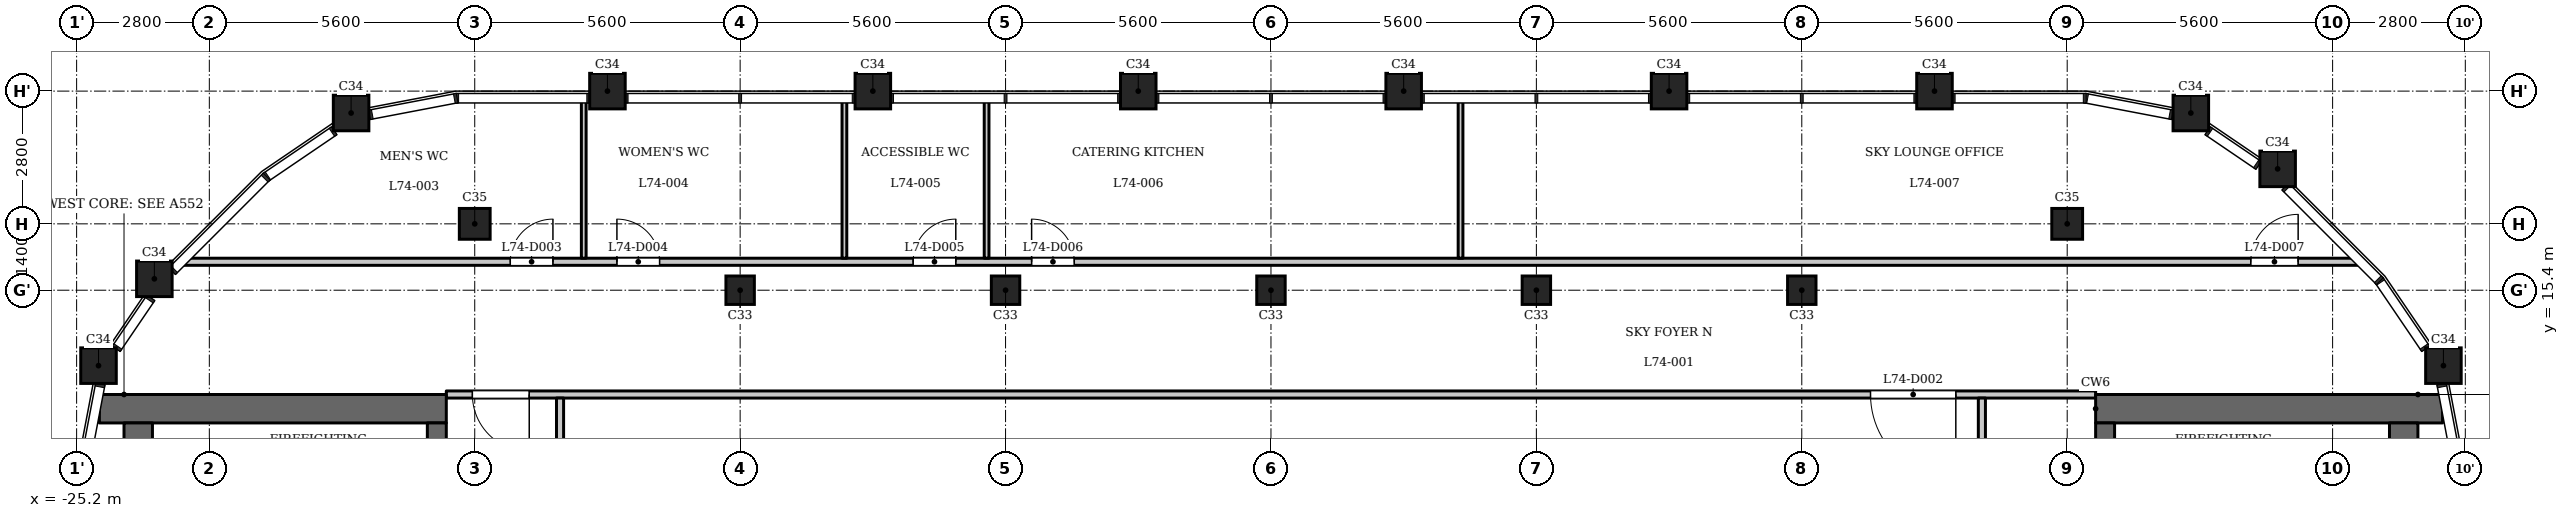
"""IFC4 building model, lengths in metres.
Left out: names, types, materials, properties, quantities, classifications, styles, units other than length and angle.
Written with IfcOpenShell. Run it as: python <this file> out.ifc"""

import sys

from ifc_helpers import new_model, si_unit, direction, frame, frame_2d, origin, origin_2d, place, context, subcontext, project, spatial, rectangle, extrude, element, fill, save


model = new_model("IFC4")
c1 = context("Model", 3, precision=1e-05, world=origin(), true_north=direction((0.0, 1.0)))
c2 = subcontext(c1, "Body", "Model", "MODEL_VIEW")
j1 = project(units=[si_unit("LENGTHUNIT", "METRE"), si_unit("PLANEANGLEUNIT", "RADIAN")], contexts=[c1])
p1 = place(None, origin())
s1 = spatial("IfcSite", under=j1, at=p1, CompositionType="ELEMENT")
p2 = place(p1, origin())
s2 = spatial("IfcBuilding", under=s1, at=p2, CompositionType="ELEMENT")
p3 = place(p2, frame((0.0, 0.0, 283.7)))
s3 = spatial("IfcBuildingStorey", under=s2, at=p3, CompositionType="ELEMENT", Elevation=283.7)
for number, where, z_axis, x_axis in (
    (1, (24.738, 13.809, 0.0), (0.0, 0.0, 1.0), (1.0, 0.0, 0.0)),
    (2, (21.24, 17.96, 0.0), (0.0, 0.0, 1.0), (1.0, 0.0, 0.0)),
    (3, (19.409, 19.138, 0.0), (0.0, 0.0, 1.0), (1.0, 0.0, 0.0)),
    (4, (14.0, 19.6, 0.0), (0.0, 0.0, 1.0), (1.0, 0.0, 0.0)),
    (5, (8.4, 19.6, 0.0), (0.0, 0.0, 1.0), (1.0, 0.0, 0.0)),
    (6, (2.8, 19.6, 0.0), (0.0, 0.0, 1.0), (1.0, 0.0, 0.0)),
    (7, (-2.8, 19.6, 0.0), (0.0, 0.0, 1.0), (1.0, 0.0, 0.0)),
    (8, (-8.4, 19.6, 0.0), (0.0, 0.0, 1.0), (1.0, 0.0, 0.0)),
    (9, (-14.0, 19.6, 0.0), (0.0, 0.0, 1.0), (1.0, 0.0, 0.0)),
    (10, (-19.409, 19.138, 0.0), (0.0, 0.0, 1.0), (1.0, 0.0, 0.0)),
    (11, (-23.56, 15.64, 0.0), (0.0, 0.0, 1.0), (1.0, 0.0, 0.0)),
    (12, (-24.738, 13.809, 0.0), (0.0, 0.0, 1.0), (1.0, 0.0, 0.0)),
):
    element("IfcColumn", number, at=place(p3, frame(where, z_axis=z_axis, x_axis=x_axis)), inside=s3, PredefinedType="COLUMN", context=c2, shape_type="SweptSolid", body=[
        extrude(rectangle(XDim=0.75, YDim=0.75, at=origin_2d()), origin(), (0.0, 0.0, 1.0), 5.4),
    ])
for number, where, z_axis, x_axis in (
    (13, (-16.8, 16.8, 0.0), (0.0, 0.0, 1.0), (1.0, 0.0, 0.0)),
    (14, (16.8, 16.8, 0.0), (0.0, 0.0, 1.0), (1.0, 0.0, 0.0)),
):
    element("IfcColumn", number, at=place(p3, frame(where, z_axis=z_axis, x_axis=x_axis)), inside=s3, PredefinedType="COLUMN", context=c2, shape_type="SweptSolid", body=[
        extrude(rectangle(XDim=0.65, YDim=0.65, at=origin_2d()), origin(), (0.0, 0.0, 1.0), 5.4),
    ])
for number, where, z_axis, x_axis in (
    (15, (-11.2, 15.4, 0.0), (0.0, 0.0, 1.0), (1.0, 0.0, 0.0)),
    (16, (-5.6, 15.4, 0.0), (0.0, 0.0, 1.0), (1.0, 0.0, 0.0)),
    (17, (0.0, 15.4, 0.0), (0.0, 0.0, 1.0), (1.0, 0.0, 0.0)),
    (18, (5.6, 15.4, 0.0), (0.0, 0.0, 1.0), (1.0, 0.0, 0.0)),
    (19, (11.2, 15.4, 0.0), (0.0, 0.0, 1.0), (1.0, 0.0, 0.0)),
):
    element("IfcColumn", number, at=place(p3, frame(where, z_axis=z_axis, x_axis=x_axis)), inside=s3, PredefinedType="COLUMN", context=c2, shape_type="SweptSolid", body=[
        extrude(rectangle(XDim=0.6, YDim=0.6, at=origin_2d()), origin(), (0.0, 0.0, 1.0), 5.4),
    ])
p4 = place(p3, frame((-17.4, 12.9, 0.0), z_axis=(0.0, 0.0, 1.0), x_axis=(-1.0, 0.0, 0.0)))
e20 = element("IfcWall", 20, at=p4, inside=s3, PredefinedType="SHEAR", context=c2, shape_type="SweptSolid", body=[
    extrude(rectangle(XDim=7.32, YDim=0.6, at=frame_2d((3.66, 0.0))), origin(), (0.0, 0.0, 1.0), 4.95),
])
p5 = place(p3, frame((-17.6, -12.6, 0.0), z_axis=(0.0, 0.0, 1.0), x_axis=(0.0, 1.0, 0.0)))
e21 = element("IfcWall", 21, at=p5, inside=s3, PredefinedType="SHEAR", context=c2, shape_type="SweptSolid", body=[
    extrude(rectangle(XDim=25.2, YDim=0.4, at=frame_2d((12.6, 0.0))), origin(), (0.0, 0.0, 1.0), 4.95),
])
p6 = place(p5, frame((6.3, 0.0, 0.0)))
e22 = element("IfcOpeningElement", 22, at=p6, cuts=e21, PredefinedType="OPENING", context=c2, shape_type="SweptSolid", body=[
    extrude(rectangle(XDim=1.1, YDim=2.1, at=frame_2d((0.55, 1.05))), frame((0.0, 0.21, 0.0), z_axis=(0.0, -1.0, 0.0), x_axis=(1.0, 0.0, 0.0)), (0.0, 0.0, 1.0), 0.42),
])
p7 = place(p5, frame((8.7, 0.0, 0.0)))
e23 = element("IfcOpeningElement", 23, at=p7, cuts=e21, PredefinedType="OPENING", context=c2, shape_type="SweptSolid", body=[
    extrude(rectangle(XDim=1.1, YDim=2.1, at=frame_2d((0.55, 1.05))), frame((0.0, 0.21, 0.0), z_axis=(0.0, -1.0, 0.0), x_axis=(1.0, 0.0, 0.0)), (0.0, 0.0, 1.0), 0.42),
])
p8 = place(p5, frame((11.2, 0.0, 0.0)))
e24 = element("IfcOpeningElement", 24, at=p8, cuts=e21, PredefinedType="OPENING", context=c2, shape_type="SweptSolid", body=[
    extrude(rectangle(XDim=0.9, YDim=2.1, at=frame_2d((0.45, 1.05))), frame((0.0, 0.21, 0.0), z_axis=(0.0, -1.0, 0.0), x_axis=(1.0, 0.0, 0.0)), (0.0, 0.0, 1.0), 0.42),
])
p9 = place(p5, frame((17.05, 0.0, 0.0)))
e25 = element("IfcOpeningElement", 25, at=p9, cuts=e21, PredefinedType="OPENING", context=c2, shape_type="SweptSolid", body=[
    extrude(rectangle(XDim=0.9, YDim=2.1, at=frame_2d((0.45, 1.05))), frame((0.0, 0.21, 0.0), z_axis=(0.0, -1.0, 0.0), x_axis=(1.0, 0.0, 0.0)), (0.0, 0.0, 1.0), 0.42),
])
p10 = place(p5, frame((23.25, 0.0, 0.0)))
e26 = element("IfcOpeningElement", 26, at=p10, cuts=e21, PredefinedType="OPENING", context=c2, shape_type="SweptSolid", body=[
    extrude(rectangle(XDim=1.1, YDim=2.1, at=frame_2d((0.55, 1.05))), frame((0.0, 0.21, 0.0), z_axis=(0.0, -1.0, 0.0), x_axis=(1.0, 0.0, 0.0)), (0.0, 0.0, 1.0), 0.42),
])
p11 = place(p5, frame((0.85, 0.0, 0.0)))
e27 = element("IfcOpeningElement", 27, at=p11, cuts=e21, PredefinedType="OPENING", context=c2, shape_type="SweptSolid", body=[
    extrude(rectangle(XDim=1.1, YDim=2.1, at=frame_2d((0.55, 1.05))), frame((0.0, 0.21, 0.0), z_axis=(0.0, -1.0, 0.0), x_axis=(1.0, 0.0, 0.0)), (0.0, 0.0, 1.0), 0.42),
])
p12 = place(p5, frame((13.075, 0.0, 0.0)))
e28 = element("IfcOpeningElement", 28, at=p12, cuts=e21, PredefinedType="OPENING", context=c2, shape_type="SweptSolid", body=[
    extrude(rectangle(XDim=1.8, YDim=2.1, at=frame_2d((0.9, 1.05))), frame((0.0, 0.21, 0.0), z_axis=(0.0, -1.0, 0.0), x_axis=(1.0, 0.0, 0.0)), (0.0, 0.0, 1.0), 0.42),
])
p13 = place(p3, frame((-23.9, -12.6, 0.0), z_axis=(0.0, 0.0, 1.0), x_axis=(0.0, 1.0, 0.0)))
e29 = element("IfcWall", 29, at=p13, inside=s3, PredefinedType="SHEAR", context=c2, shape_type="SweptSolid", body=[
    extrude(rectangle(XDim=25.2, YDim=0.6, at=frame_2d((12.6, 0.0))), origin(), (0.0, 0.0, 1.0), 4.95),
])
p14 = place(p3, frame((17.4, 12.9, 0.0), z_axis=(0.0, 0.0, 1.0), x_axis=(1.0, 0.0, 0.0)))
e30 = element("IfcWall", 30, at=p14, inside=s3, PredefinedType="SHEAR", context=c2, shape_type="SweptSolid", body=[
    extrude(rectangle(XDim=7.32, YDim=0.6, at=frame_2d((3.66, 0.0))), origin(), (0.0, 0.0, 1.0), 4.95),
])
p15 = place(p3, frame((17.6, -12.6, 0.0), z_axis=(0.0, 0.0, 1.0), x_axis=(0.0, 1.0, 0.0)))
e31 = element("IfcWall", 31, at=p15, inside=s3, PredefinedType="SHEAR", context=c2, shape_type="SweptSolid", body=[
    extrude(rectangle(XDim=25.2, YDim=0.4, at=frame_2d((12.6, 0.0))), origin(), (0.0, 0.0, 1.0), 4.95),
])
p16 = place(p15, frame((6.3, 0.0, 0.0)))
e32 = element("IfcOpeningElement", 32, at=p16, cuts=e31, PredefinedType="OPENING", context=c2, shape_type="SweptSolid", body=[
    extrude(rectangle(XDim=1.1, YDim=2.1, at=frame_2d((0.55, 1.05))), frame((0.0, 0.21, 0.0), z_axis=(0.0, -1.0, 0.0), x_axis=(1.0, 0.0, 0.0)), (0.0, 0.0, 1.0), 0.42),
])
p17 = place(p15, frame((8.7, 0.0, 0.0)))
e33 = element("IfcOpeningElement", 33, at=p17, cuts=e31, PredefinedType="OPENING", context=c2, shape_type="SweptSolid", body=[
    extrude(rectangle(XDim=1.1, YDim=2.1, at=frame_2d((0.55, 1.05))), frame((0.0, 0.21, 0.0), z_axis=(0.0, -1.0, 0.0), x_axis=(1.0, 0.0, 0.0)), (0.0, 0.0, 1.0), 0.42),
])
p18 = place(p15, frame((11.2, 0.0, 0.0)))
e34 = element("IfcOpeningElement", 34, at=p18, cuts=e31, PredefinedType="OPENING", context=c2, shape_type="SweptSolid", body=[
    extrude(rectangle(XDim=0.9, YDim=2.1, at=frame_2d((0.45, 1.05))), frame((0.0, 0.21, 0.0), z_axis=(0.0, -1.0, 0.0), x_axis=(1.0, 0.0, 0.0)), (0.0, 0.0, 1.0), 0.42),
])
p19 = place(p15, frame((17.05, 0.0, 0.0)))
e35 = element("IfcOpeningElement", 35, at=p19, cuts=e31, PredefinedType="OPENING", context=c2, shape_type="SweptSolid", body=[
    extrude(rectangle(XDim=0.9, YDim=2.1, at=frame_2d((0.45, 1.05))), frame((0.0, 0.21, 0.0), z_axis=(0.0, -1.0, 0.0), x_axis=(1.0, 0.0, 0.0)), (0.0, 0.0, 1.0), 0.42),
])
p20 = place(p15, frame((23.25, 0.0, 0.0)))
e36 = element("IfcOpeningElement", 36, at=p20, cuts=e31, PredefinedType="OPENING", context=c2, shape_type="SweptSolid", body=[
    extrude(rectangle(XDim=1.1, YDim=2.1, at=frame_2d((0.55, 1.05))), frame((0.0, 0.21, 0.0), z_axis=(0.0, -1.0, 0.0), x_axis=(1.0, 0.0, 0.0)), (0.0, 0.0, 1.0), 0.42),
])
p21 = place(p15, frame((0.85, 0.0, 0.0)))
e37 = element("IfcOpeningElement", 37, at=p21, cuts=e31, PredefinedType="OPENING", context=c2, shape_type="SweptSolid", body=[
    extrude(rectangle(XDim=1.1, YDim=2.1, at=frame_2d((0.55, 1.05))), frame((0.0, 0.21, 0.0), z_axis=(0.0, -1.0, 0.0), x_axis=(1.0, 0.0, 0.0)), (0.0, 0.0, 1.0), 0.42),
])
p22 = place(p15, frame((13.075, 0.0, 0.0)))
e38 = element("IfcOpeningElement", 38, at=p22, cuts=e31, PredefinedType="OPENING", context=c2, shape_type="SweptSolid", body=[
    extrude(rectangle(XDim=1.8, YDim=2.1, at=frame_2d((0.9, 1.05))), frame((0.0, 0.21, 0.0), z_axis=(0.0, -1.0, 0.0), x_axis=(1.0, 0.0, 0.0)), (0.0, 0.0, 1.0), 0.42),
])
p23 = place(p3, frame((23.9, -12.6, 0.0), z_axis=(0.0, 0.0, 1.0), x_axis=(0.0, 1.0, 0.0)))
e39 = element("IfcWall", 39, at=p23, inside=s3, PredefinedType="SHEAR", context=c2, shape_type="SweptSolid", body=[
    extrude(rectangle(XDim=25.2, YDim=0.6, at=frame_2d((12.6, 0.0))), origin(), (0.0, 0.0, 1.0), 4.95),
])
p24 = place(p3, frame((-17.4, 13.2, 0.0), z_axis=(0.0, 0.0, 1.0), x_axis=(1.0, 0.0, 0.0)))
e40 = element("IfcWall", 40, at=p24, inside=s3, PredefinedType="PARTITIONING", context=c2, shape_type="SweptSolid", body=[
    extrude(rectangle(XDim=34.8, YDim=0.15, at=frame_2d((17.4, 0.0))), origin(), (0.0, 0.0, 1.0), 4.95),
])
p25 = place(p24, frame((0.55, 0.0, 0.0)))
e41 = element("IfcOpeningElement", 41, at=p25, cuts=e40, PredefinedType="OPENING", context=c2, shape_type="SweptSolid", body=[
    extrude(rectangle(XDim=1.2, YDim=2.1, at=frame_2d((0.6, 1.05))), frame((0.0, 0.085, 0.0), z_axis=(0.0, -1.0, 0.0), x_axis=(1.0, 0.0, 0.0)), (0.0, 0.0, 1.0), 0.17),
])
p26 = place(p24, frame((30.05, 0.0, 0.0)))
e42 = element("IfcOpeningElement", 42, at=p26, cuts=e40, PredefinedType="OPENING", context=c2, shape_type="SweptSolid", body=[
    extrude(rectangle(XDim=1.8, YDim=2.1, at=frame_2d((0.9, 1.05))), frame((0.0, 0.085, 0.0), z_axis=(0.0, -1.0, 0.0), x_axis=(1.0, 0.0, 0.0)), (0.0, 0.0, 1.0), 0.17),
])
p27 = place(p3, frame((-22.948, 16.0, 0.0), z_axis=(0.0, 0.0, 1.0), x_axis=(1.0, 0.0, 0.0)))
e43 = element("IfcWall", 43, at=p27, inside=s3, PredefinedType="PARTITIONING", context=c2, shape_type="SweptSolid", body=[
    extrude(rectangle(XDim=45.896, YDim=0.15, at=frame_2d((22.948, 0.0))), origin(), (0.0, 0.0, 1.0), 4.95),
])
p28 = place(p27, frame((6.898, 0.0, 0.0)))
e44 = element("IfcOpeningElement", 44, at=p28, cuts=e43, PredefinedType="OPENING", context=c2, shape_type="SweptSolid", body=[
    extrude(rectangle(XDim=0.9, YDim=2.1, at=frame_2d((0.45, 1.05))), frame((0.0, 0.085, 0.0), z_axis=(0.0, -1.0, 0.0), x_axis=(1.0, 0.0, 0.0)), (0.0, 0.0, 1.0), 0.17),
])
p29 = place(p27, frame((9.148, 0.0, 0.0)))
e45 = element("IfcOpeningElement", 45, at=p29, cuts=e43, PredefinedType="OPENING", context=c2, shape_type="SweptSolid", body=[
    extrude(rectangle(XDim=0.9, YDim=2.1, at=frame_2d((0.45, 1.05))), frame((0.0, 0.085, 0.0), z_axis=(0.0, -1.0, 0.0), x_axis=(1.0, 0.0, 0.0)), (0.0, 0.0, 1.0), 0.17),
])
p30 = place(p27, frame((15.398, 0.0, 0.0)))
e46 = element("IfcOpeningElement", 46, at=p30, cuts=e43, PredefinedType="OPENING", context=c2, shape_type="SweptSolid", body=[
    extrude(rectangle(XDim=0.9, YDim=2.1, at=frame_2d((0.45, 1.05))), frame((0.0, 0.085, 0.0), z_axis=(0.0, -1.0, 0.0), x_axis=(1.0, 0.0, 0.0)), (0.0, 0.0, 1.0), 0.17),
])
p31 = place(p27, frame((17.898, 0.0, 0.0)))
e47 = element("IfcOpeningElement", 47, at=p31, cuts=e43, PredefinedType="OPENING", context=c2, shape_type="SweptSolid", body=[
    extrude(rectangle(XDim=0.9, YDim=2.1, at=frame_2d((0.45, 1.05))), frame((0.0, 0.085, 0.0), z_axis=(0.0, -1.0, 0.0), x_axis=(1.0, 0.0, 0.0)), (0.0, 0.0, 1.0), 0.17),
])
p32 = place(p27, frame((43.621, 0.0, 0.0)))
e48 = element("IfcOpeningElement", 48, at=p32, cuts=e43, PredefinedType="OPENING", context=c2, shape_type="SweptSolid", body=[
    extrude(rectangle(XDim=1.0, YDim=2.1, at=frame_2d((0.5, 1.05))), frame((0.0, 0.085, 0.0), z_axis=(0.0, -1.0, 0.0), x_axis=(1.0, 0.0, 0.0)), (0.0, 0.0, 1.0), 0.17),
])
p33 = place(p3, frame((-15.0, 6.769, 0.0), z_axis=(0.0, 0.0, 1.0), x_axis=(0.0, 1.0, 0.0)))
e49 = element("IfcWall", 49, at=p33, inside=s3, PredefinedType="PARTITIONING", context=c2, shape_type="SweptSolid", body=[
    extrude(rectangle(XDim=6.356, YDim=0.15, at=frame_2d((3.178, 0.0))), origin(), (0.0, 0.0, 1.0), 4.95),
])
for number, where, z_axis, x_axis in (
    (50, (-14.5, 16.075, 0.0), (0.0, 0.0, 1.0), (0.0, 1.0, 0.0)),
    (51, (-9.0, 16.075, 0.0), (0.0, 0.0, 1.0), (0.0, 1.0, 0.0)),
    (52, (-6.0, 16.075, 0.0), (0.0, 0.0, 1.0), (0.0, 1.0, 0.0)),
    (53, (4.0, 16.075, 0.0), (0.0, 0.0, 1.0), (0.0, 1.0, 0.0)),
):
    element("IfcWall", number, at=place(p3, frame(where, z_axis=z_axis, x_axis=x_axis)), inside=s3, PredefinedType="PARTITIONING", context=c2, shape_type="SweptSolid", body=[
        extrude(rectangle(XDim=3.341, YDim=0.1, at=frame_2d((1.67, 0.0))), origin(), (0.0, 0.0, 1.0), 4.95),
    ])
p34 = place(p3, frame((15.0, 6.769, 0.0), z_axis=(0.0, 0.0, 1.0), x_axis=(0.0, 1.0, 0.0)))
e54 = element("IfcWall", 54, at=p34, inside=s3, PredefinedType="PARTITIONING", context=c2, shape_type="SweptSolid", body=[
    extrude(rectangle(XDim=6.356, YDim=0.15, at=frame_2d((3.178, 0.0))), origin(), (0.0, 0.0, 1.0), 4.95),
])
p35 = place(p25, origin())
e55 = element("IfcDoor", 55, at=p35, inside=s3, OperationType="SINGLE_SWING_RIGHT", PredefinedType="DOOR", context=c2, shape_type="SweptSolid", body=[
    extrude(rectangle(XDim=1.2, YDim=2.1, at=frame_2d((0.6, 1.05))), frame((0.0, 0.025, 0.0), z_axis=(0.0, -1.0, 0.0), x_axis=(1.0, 0.0, 0.0)), (0.0, 0.0, 1.0), 0.05),
])
fill(e41, e55)
p36 = place(p26, origin())
e56 = element("IfcDoor", 56, at=p36, inside=s3, OperationType="SINGLE_SWING_RIGHT", PredefinedType="DOOR", context=c2, shape_type="SweptSolid", body=[
    extrude(rectangle(XDim=1.8, YDim=2.1, at=frame_2d((0.9, 1.05))), frame((0.0, 0.025, 0.0), z_axis=(0.0, -1.0, 0.0), x_axis=(1.0, 0.0, 0.0)), (0.0, 0.0, 1.0), 0.05),
])
fill(e42, e56)
p37 = place(p28, origin())
e57 = element("IfcDoor", 57, at=p37, inside=s3, OperationType="SINGLE_SWING_LEFT", PredefinedType="DOOR", context=c2, shape_type="SweptSolid", body=[
    extrude(rectangle(XDim=0.9, YDim=2.1, at=frame_2d((0.45, 1.05))), frame((0.0, 0.025, 0.0), z_axis=(0.0, -1.0, 0.0), x_axis=(1.0, 0.0, 0.0)), (0.0, 0.0, 1.0), 0.05),
])
fill(e44, e57)
p38 = place(p29, origin())
e58 = element("IfcDoor", 58, at=p38, inside=s3, OperationType="SINGLE_SWING_RIGHT", PredefinedType="DOOR", context=c2, shape_type="SweptSolid", body=[
    extrude(rectangle(XDim=0.9, YDim=2.1, at=frame_2d((0.45, 1.05))), frame((0.0, 0.025, 0.0), z_axis=(0.0, -1.0, 0.0), x_axis=(1.0, 0.0, 0.0)), (0.0, 0.0, 1.0), 0.05),
])
fill(e45, e58)
p39 = place(p30, origin())
e59 = element("IfcDoor", 59, at=p39, inside=s3, OperationType="SINGLE_SWING_LEFT", PredefinedType="DOOR", context=c2, shape_type="SweptSolid", body=[
    extrude(rectangle(XDim=0.9, YDim=2.1, at=frame_2d((0.45, 1.05))), frame((0.0, 0.025, 0.0), z_axis=(0.0, -1.0, 0.0), x_axis=(1.0, 0.0, 0.0)), (0.0, 0.0, 1.0), 0.05),
])
fill(e46, e59)
p40 = place(p31, origin())
e60 = element("IfcDoor", 60, at=p40, inside=s3, OperationType="SINGLE_SWING_RIGHT", PredefinedType="DOOR", context=c2, shape_type="SweptSolid", body=[
    extrude(rectangle(XDim=0.9, YDim=2.1, at=frame_2d((0.45, 1.05))), frame((0.0, 0.025, 0.0), z_axis=(0.0, -1.0, 0.0), x_axis=(1.0, 0.0, 0.0)), (0.0, 0.0, 1.0), 0.05),
])
fill(e47, e60)
p41 = place(p32, origin())
e61 = element("IfcDoor", 61, at=p41, inside=s3, OperationType="SINGLE_SWING_LEFT", PredefinedType="DOOR", context=c2, shape_type="SweptSolid", body=[
    extrude(rectangle(XDim=1.0, YDim=2.1, at=frame_2d((0.5, 1.05))), frame((0.0, 0.025, 0.0), z_axis=(0.0, -1.0, 0.0), x_axis=(1.0, 0.0, 0.0)), (0.0, 0.0, 1.0), 0.05),
])
fill(e48, e61)
save(model, sys.argv[1])
